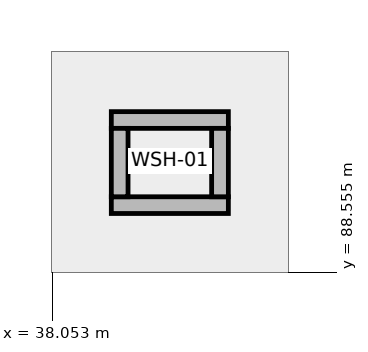
"""IFC4 building model, lengths in metres.
Left out: names, types, materials, properties, quantities, classifications, styles, units other than length and angle.
Written with IfcOpenShell. Run it as: python <this file> out.ifc"""

import sys

from ifc_helpers import new_model, si_unit, direction, frame, frame_2d, origin, place, context, subcontext, project, spatial, rectangle, extrude, element, save


model = new_model("IFC4")
c1 = context("Model", 3, precision=1e-05, world=origin(), true_north=direction((0.0, 1.0)))
c2 = subcontext(c1, "Body", "Model", "MODEL_VIEW")
j1 = project(units=[si_unit("LENGTHUNIT", "METRE"), si_unit("PLANEANGLEUNIT", "RADIAN")], contexts=[c1])
p1 = place(None, origin())
s1 = spatial("IfcSite", under=j1, at=p1, CompositionType="ELEMENT")
p2 = place(p1, origin())
s2 = spatial("IfcBuilding", under=s1, at=p2, CompositionType="ELEMENT")
p3 = place(p2, frame((0.0, 0.0, -4.5)))
s3 = spatial("IfcBuildingStorey", under=s2, at=p3, CompositionType="ELEMENT", Elevation=-4.5)
for number, where, z_axis, x_axis in (
    (1, (38.83, 89.44, 0.0), (0.0, 0.0, 1.0), (1.0, 0.0, 0.0)),
    (2, (38.83, 90.56, 0.0), (0.0, 0.0, 1.0), (1.0, 0.0, 0.0)),
):
    element("IfcWall", number, at=place(p3, frame(where, z_axis=z_axis, x_axis=x_axis)), inside=s3, PredefinedType="STANDARD", context=c2, shape_type="SweptSolid", body=[
        extrude(rectangle(XDim=1.54, YDim=0.22, at=frame_2d((0.77, 0.0))), origin(), (0.0, 0.0, 1.0), 3.19),
    ])
for number, where, z_axis, x_axis in (
    (3, (38.94, 89.55, 0.0), (0.0, 0.0, 1.0), (0.0, 1.0, 0.0)),
    (4, (40.26, 89.55, 0.0), (0.0, 0.0, 1.0), (0.0, 1.0, 0.0)),
):
    element("IfcWall", number, at=place(p3, frame(where, z_axis=z_axis, x_axis=x_axis)), inside=s3, PredefinedType="STANDARD", context=c2, shape_type="SweptSolid", body=[
        extrude(rectangle(XDim=0.9, YDim=0.22, at=frame_2d((0.45, 0.0))), origin(), (0.0, 0.0, 1.0), 3.19),
    ])
save(model, sys.argv[1])
